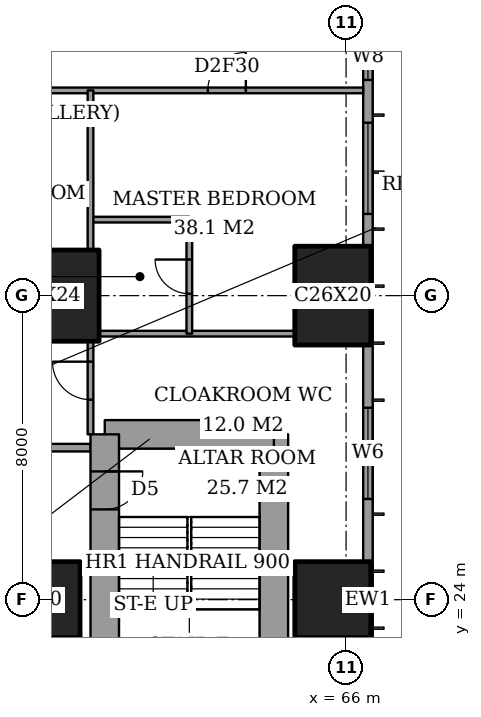
"""IFC4 building model, lengths in metres.
Left out: names, types, materials, properties, quantities, classifications, styles, units other than length and angle.
Written with IfcOpenShell. Run it as: python <this file> out.ifc"""

import sys

from ifc_helpers import new_model, si_unit, direction, frame, frame_2d, origin, origin_2d, place, context, subcontext, project, spatial, rectangle, extrude, element, fill, save


model = new_model("IFC4")
c1 = context("Model", 3, precision=1e-05, world=origin(), true_north=direction((0.0, 1.0)))
c2 = subcontext(c1, "Body", "Model", "MODEL_VIEW")
j1 = project(units=[si_unit("LENGTHUNIT", "METRE"), si_unit("PLANEANGLEUNIT", "RADIAN")], contexts=[c1])
p1 = place(None, origin())
s1 = spatial("IfcSite", under=j1, at=p1, CompositionType="ELEMENT")
p2 = place(p1, origin())
s2 = spatial("IfcBuilding", under=s1, at=p2, CompositionType="ELEMENT")
p3 = place(p2, frame((0.0, 0.0, 33.2)))
s3 = spatial("IfcBuildingStorey", under=s2, at=p3, CompositionType="ELEMENT", Elevation=33.2)
p4 = place(p3, frame((58.0, 24.0, 0.0), z_axis=(0.0, 0.0, 1.0), x_axis=(1.0, 0.0, 0.0)))
e1 = element("IfcColumn", 1, at=p4, inside=s3, PredefinedType="COLUMN", context=c2, shape_type="SweptSolid", body=[
    extrude(rectangle(XDim=2.0, YDim=2.0, at=origin_2d()), origin(), (0.0, 0.0, 1.0), 3.6),
])
p5 = place(p3, frame((58.0, 32.0, 0.0), z_axis=(0.0, 0.0, 1.0), x_axis=(1.0, 0.0, 0.0)))
e2 = element("IfcColumn", 2, at=p5, inside=s3, PredefinedType="COLUMN", context=c2, shape_type="SweptSolid", body=[
    extrude(rectangle(XDim=3.0, YDim=2.4, at=origin_2d()), origin(), (0.0, 0.0, 1.0), 3.6),
])
p6 = place(p3, frame((65.65, 24.0, 0.0), z_axis=(0.0, 0.0, 1.0), x_axis=(1.0, 0.0, 0.0)))
e3 = element("IfcColumn", 3, at=p6, inside=s3, PredefinedType="COLUMN", context=c2, shape_type="SweptSolid", body=[
    extrude(rectangle(XDim=2.0, YDim=2.0, at=origin_2d()), origin(), (0.0, 0.0, 1.0), 3.6),
])
p7 = place(p3, frame((65.65, 32.0, 0.0), z_axis=(0.0, 0.0, 1.0), x_axis=(0.0, 1.0, 0.0)))
e4 = element("IfcColumn", 4, at=p7, inside=s3, PredefinedType="COLUMN", context=c2, shape_type="SweptSolid", body=[
    extrude(rectangle(XDim=2.6, YDim=2.0, at=origin_2d()), origin(), (0.0, 0.0, 1.0), 3.6),
])
p8 = place(p3, frame((64.1, 19.65, 0.0), z_axis=(0.0, 0.0, 1.0), x_axis=(0.0, 1.0, 0.0)))
e5 = element("IfcWall", 5, at=p8, inside=s3, PredefinedType="SHEAR", context=c2, shape_type="SweptSolid", body=[
    extrude(rectangle(XDim=8.7, YDim=0.75, at=frame_2d((4.35, 0.0))), origin(), (0.0, 0.0, 1.0), 3.6),
])
p9 = place(p3, frame((64.1, 28.35, 0.0), z_axis=(0.0, 0.0, 1.0), x_axis=(-1.0, 0.0, 0.0)))
e6 = element("IfcWall", 6, at=p9, inside=s3, PredefinedType="SHEAR", context=c2, shape_type="SweptSolid", body=[
    extrude(rectangle(XDim=4.45, YDim=0.75, at=frame_2d((2.225, 0.0))), origin(), (0.0, 0.0, 1.0), 3.6),
])
p10 = place(p3, frame((59.65, 28.35, 0.0), z_axis=(0.0, 0.0, 1.0), x_axis=(0.0, -1.0, 0.0)))
e7 = element("IfcWall", 7, at=p10, inside=s3, PredefinedType="SHEAR", context=c2, shape_type="SweptSolid", body=[
    extrude(rectangle(XDim=8.7, YDim=0.75, at=frame_2d((4.35, 0.0))), origin(), (0.0, 0.0, 1.0), 3.6),
])
p11 = place(p10, frame((0.975, 0.0, 0.0)))
e8 = element("IfcOpeningElement", 8, at=p11, cuts=e7, PredefinedType="OPENING", context=c2, shape_type="SweptSolid", body=[
    extrude(rectangle(XDim=1.0, YDim=2.1, at=frame_2d((0.5, 1.05))), frame((0.0, 0.385, 0.0), z_axis=(0.0, -1.0, 0.0), x_axis=(1.0, 0.0, 0.0)), (0.0, 0.0, 1.0), 0.77),
])
p12 = place(p3, frame((66.575, 3.175, 0.0), z_axis=(0.0, 0.0, 1.0), x_axis=(0.0, 1.0, 0.0)))
e9 = element("IfcWall", 9, at=p12, inside=s3, PredefinedType="SOLIDWALL", context=c2, shape_type="SweptSolid", body=[
    extrude(rectangle(XDim=41.65, YDim=0.25, at=frame_2d((20.825, 0.0))), origin(), (0.0, 0.0, 1.0), 3.6),
])
p13 = place(p12, frame((0.775, 0.0, 0.6)))
e10 = element("IfcOpeningElement", 10, at=p13, cuts=e9, PredefinedType="OPENING", context=c2, shape_type="SweptSolid", body=[
    extrude(rectangle(XDim=2.4, YDim=2.0, at=frame_2d((1.2, 1.0))), frame((0.0, 0.135, 0.0), z_axis=(0.0, -1.0, 0.0), x_axis=(1.0, 0.0, 0.0)), (0.0, 0.0, 1.0), 0.27),
])
p14 = place(p12, frame((6.1, 0.0, 0.6)))
e11 = element("IfcOpeningElement", 11, at=p14, cuts=e9, PredefinedType="OPENING", context=c2, shape_type="SweptSolid", body=[
    extrude(rectangle(XDim=1.2, YDim=2.0, at=frame_2d((0.6, 1.0))), frame((0.0, 0.135, 0.0), z_axis=(0.0, -1.0, 0.0), x_axis=(1.0, 0.0, 0.0)), (0.0, 0.0, 1.0), 0.27),
])
p15 = place(p12, frame((8.275, 0.0, 0.6)))
e12 = element("IfcOpeningElement", 12, at=p15, cuts=e9, PredefinedType="OPENING", context=c2, shape_type="SweptSolid", body=[
    extrude(rectangle(XDim=2.4, YDim=2.0, at=frame_2d((1.2, 1.0))), frame((0.0, 0.135, 0.0), z_axis=(0.0, -1.0, 0.0), x_axis=(1.0, 0.0, 0.0)), (0.0, 0.0, 1.0), 0.27),
])
p16 = place(p12, frame((15.775, 0.0, 0.6)))
e13 = element("IfcOpeningElement", 13, at=p16, cuts=e9, PredefinedType="OPENING", context=c2, shape_type="SweptSolid", body=[
    extrude(rectangle(XDim=2.4, YDim=2.0, at=frame_2d((1.2, 1.0))), frame((0.0, 0.135, 0.0), z_axis=(0.0, -1.0, 0.0), x_axis=(1.0, 0.0, 0.0)), (0.0, 0.0, 1.0), 0.27),
])
p17 = place(p12, frame((23.475, 0.0, 0.6)))
e14 = element("IfcOpeningElement", 14, at=p17, cuts=e9, PredefinedType="OPENING", context=c2, shape_type="SweptSolid", body=[
    extrude(rectangle(XDim=2.4, YDim=2.0, at=frame_2d((1.2, 1.0))), frame((0.0, 0.135, 0.0), z_axis=(0.0, -1.0, 0.0), x_axis=(1.0, 0.0, 0.0)), (0.0, 0.0, 1.0), 0.27),
])
p18 = place(p12, frame((30.975, 0.0, 0.6)))
e15 = element("IfcOpeningElement", 15, at=p18, cuts=e9, PredefinedType="OPENING", context=c2, shape_type="SweptSolid", body=[
    extrude(rectangle(XDim=2.4, YDim=2.0, at=frame_2d((1.2, 1.0))), frame((0.0, 0.135, 0.0), z_axis=(0.0, -1.0, 0.0), x_axis=(1.0, 0.0, 0.0)), (0.0, 0.0, 1.0), 0.27),
])
p19 = place(p12, frame((34.5, 0.0, 0.6)))
e16 = element("IfcOpeningElement", 16, at=p19, cuts=e9, PredefinedType="OPENING", context=c2, shape_type="SweptSolid", body=[
    extrude(rectangle(XDim=1.2, YDim=2.0, at=frame_2d((0.6, 1.0))), frame((0.0, 0.135, 0.0), z_axis=(0.0, -1.0, 0.0), x_axis=(1.0, 0.0, 0.0)), (0.0, 0.0, 1.0), 0.27),
])
p20 = place(p12, frame((38.475, 0.0, 0.6)))
e17 = element("IfcOpeningElement", 17, at=p20, cuts=e9, PredefinedType="OPENING", context=c2, shape_type="SweptSolid", body=[
    extrude(rectangle(XDim=2.4, YDim=2.0, at=frame_2d((1.2, 1.0))), frame((0.0, 0.135, 0.0), z_axis=(0.0, -1.0, 0.0), x_axis=(1.0, 0.0, 0.0)), (0.0, 0.0, 1.0), 0.27),
])
p21 = place(p3, frame((42.0, 28.0, 0.0), z_axis=(0.0, 0.0, 1.0), x_axis=(1.0, 0.0, 0.0)))
e18 = element("IfcWall", 18, at=p21, inside=s3, PredefinedType="PARTITIONING", context=c2, shape_type="SweptSolid", body=[
    extrude(rectangle(XDim=17.275, YDim=0.2, at=frame_2d((8.637, 0.0))), origin(), (0.0, 0.0, 1.0), 3.35),
])
p22 = place(p21, frame((8.9, 0.0, 0.0)))
e19 = element("IfcOpeningElement", 19, at=p22, cuts=e18, PredefinedType="OPENING", context=c2, shape_type="SweptSolid", body=[
    extrude(rectangle(XDim=1.2, YDim=2.4, at=frame_2d((0.6, 1.2))), frame((0.0, 0.11, 0.0), z_axis=(0.0, -1.0, 0.0), x_axis=(1.0, 0.0, 0.0)), (0.0, 0.0, 1.0), 0.22),
])
p23 = place(p3, frame((59.5, 31.0, 0.0), z_axis=(0.0, 0.0, 1.0), x_axis=(1.0, 0.0, 0.0)))
e20 = element("IfcWall", 20, at=p23, inside=s3, PredefinedType="PARTITIONING", context=c2, shape_type="SweptSolid", body=[
    extrude(rectangle(XDim=5.15, YDim=0.15, at=frame_2d((2.575, 0.0))), origin(), (0.0, 0.0, 1.0), 3.35),
])
p24 = place(p3, frame((59.275, 34.0, 0.0), z_axis=(0.0, 0.0, 1.0), x_axis=(1.0, 0.0, 0.0)))
e21 = element("IfcWall", 21, at=p24, inside=s3, PredefinedType="PARTITIONING", context=c2, shape_type="SweptSolid", body=[
    extrude(rectangle(XDim=2.6, YDim=0.15, at=frame_2d((1.3, 0.0))), origin(), (0.0, 0.0, 1.0), 3.35),
])
p25 = place(p3, frame((41.439, 37.4, 0.0), z_axis=(0.0, 0.0, 1.0), x_axis=(1.0, 0.0, 0.0)))
e22 = element("IfcWall", 22, at=p25, inside=s3, PredefinedType="PARTITIONING", context=c2, shape_type="SweptSolid", body=[
    extrude(rectangle(XDim=25.011, YDim=0.15, at=frame_2d((12.505, 0.0))), origin(), (0.0, 0.0, 1.0), 3.35),
])
p26 = place(p25, frame((11.961, 0.0, 0.0)))
e23 = element("IfcOpeningElement", 23, at=p26, cuts=e22, PredefinedType="OPENING", context=c2, shape_type="SweptSolid", body=[
    extrude(rectangle(XDim=1.0, YDim=2.1, at=frame_2d((0.5, 1.05))), frame((0.0, 0.085, 0.0), z_axis=(0.0, -1.0, 0.0), x_axis=(1.0, 0.0, 0.0)), (0.0, 0.0, 1.0), 0.17),
])
p27 = place(p25, frame((20.924, 0.0, 0.0)))
e24 = element("IfcOpeningElement", 24, at=p27, cuts=e22, PredefinedType="OPENING", context=c2, shape_type="SweptSolid", body=[
    extrude(rectangle(XDim=1.0, YDim=2.1, at=frame_2d((0.5, 1.05))), frame((0.0, 0.085, 0.0), z_axis=(0.0, -1.0, 0.0), x_axis=(1.0, 0.0, 0.0)), (0.0, 0.0, 1.0), 0.17),
])
p28 = place(p25, frame((15.249, 0.0, 0.0)))
e25 = element("IfcOpeningElement", 25, at=p28, cuts=e22, PredefinedType="OPENING", context=c2, shape_type="SweptSolid", body=[
    extrude(rectangle(XDim=0.9, YDim=2.1, at=frame_2d((0.45, 1.05))), frame((0.0, 0.085, 0.0), z_axis=(0.0, -1.0, 0.0), x_axis=(1.0, 0.0, 0.0)), (0.0, 0.0, 1.0), 0.17),
])
p29 = place(p25, frame((9.561, 0.0, 0.0)))
e26 = element("IfcOpeningElement", 26, at=p29, cuts=e22, PredefinedType="OPENING", context=c2, shape_type="SweptSolid", body=[
    extrude(rectangle(XDim=1.0, YDim=2.1, at=frame_2d((0.5, 1.05))), frame((0.0, 0.085, 0.0), z_axis=(0.0, -1.0, 0.0), x_axis=(1.0, 0.0, 0.0)), (0.0, 0.0, 1.0), 0.17),
])
p30 = place(p25, frame((7.161, 0.0, 0.0)))
e27 = element("IfcOpeningElement", 27, at=p30, cuts=e22, PredefinedType="OPENING", context=c2, shape_type="SweptSolid", body=[
    extrude(rectangle(XDim=1.0, YDim=2.1, at=frame_2d((0.5, 1.05))), frame((0.0, 0.085, 0.0), z_axis=(0.0, -1.0, 0.0), x_axis=(1.0, 0.0, 0.0)), (0.0, 0.0, 1.0), 0.17),
])
p31 = place(p25, frame((2.836, 0.0, 0.0)))
e28 = element("IfcOpeningElement", 28, at=p31, cuts=e22, PredefinedType="OPENING", context=c2, shape_type="SweptSolid", body=[
    extrude(rectangle(XDim=1.0, YDim=2.1, at=frame_2d((0.5, 1.05))), frame((0.0, 0.085, 0.0), z_axis=(0.0, -1.0, 0.0), x_axis=(1.0, 0.0, 0.0)), (0.0, 0.0, 1.0), 0.17),
])
p32 = place(p3, frame((59.275, 28.35, 0.0), z_axis=(0.0, 0.0, 1.0), x_axis=(0.0, 1.0, 0.0)))
e29 = element("IfcWall", 29, at=p32, inside=s3, PredefinedType="PARTITIONING", context=c2, shape_type="SweptSolid", body=[
    extrude(rectangle(XDim=2.45, YDim=0.15, at=frame_2d((1.225, 0.0))), origin(), (0.0, 0.0, 1.0), 3.35),
])
p33 = place(p32, frame((0.913, 0.0, 0.0)))
e30 = element("IfcOpeningElement", 30, at=p33, cuts=e29, PredefinedType="OPENING", context=c2, shape_type="SweptSolid", body=[
    extrude(rectangle(XDim=1.0, YDim=2.1, at=frame_2d((0.5, 1.05))), frame((0.0, 0.085, 0.0), z_axis=(0.0, -1.0, 0.0), x_axis=(1.0, 0.0, 0.0)), (0.0, 0.0, 1.0), 0.17),
])
p34 = place(p3, frame((59.275, 33.2, 0.0), z_axis=(0.0, 0.0, 1.0), x_axis=(0.0, 1.0, 0.0)))
e31 = element("IfcWall", 31, at=p34, inside=s3, PredefinedType="PARTITIONING", context=c2, shape_type="SweptSolid", body=[
    extrude(rectangle(XDim=4.2, YDim=0.15, at=frame_2d((2.1, 0.0))), origin(), (0.0, 0.0, 1.0), 3.35),
])
p35 = place(p3, frame((61.875, 31.0, 0.0), z_axis=(0.0, 0.0, 1.0), x_axis=(0.0, 1.0, 0.0)))
e32 = element("IfcWall", 32, at=p35, inside=s3, PredefinedType="PARTITIONING", context=c2, shape_type="SweptSolid", body=[
    extrude(rectangle(XDim=3.0, YDim=0.15, at=frame_2d((1.5, 0.0))), origin(), (0.0, 0.0, 1.0), 3.35),
])
p36 = place(p35, frame((1.05, 0.0, 0.0)))
e33 = element("IfcOpeningElement", 33, at=p36, cuts=e32, PredefinedType="OPENING", context=c2, shape_type="SweptSolid", body=[
    extrude(rectangle(XDim=0.9, YDim=2.1, at=frame_2d((0.45, 1.05))), frame((0.0, 0.085, 0.0), z_axis=(0.0, -1.0, 0.0), x_axis=(1.0, 0.0, 0.0)), (0.0, 0.0, 1.0), 0.17),
])
p37 = place(p17, origin())
e34 = element("IfcWindow", 34, at=p37, inside=s3, PartitioningType="SINGLE_PANEL", PredefinedType="WINDOW", context=c2, shape_type="SweptSolid", body=[
    extrude(rectangle(XDim=2.4, YDim=2.0, at=frame_2d((1.2, 1.0))), frame((0.0, 0.03, 0.0), z_axis=(0.0, -1.0, 0.0), x_axis=(1.0, 0.0, 0.0)), (0.0, 0.0, 1.0), 0.06),
])
fill(e14, e34)
p38 = place(p18, origin())
e35 = element("IfcWindow", 35, at=p38, inside=s3, PartitioningType="SINGLE_PANEL", PredefinedType="WINDOW", context=c2, shape_type="SweptSolid", body=[
    extrude(rectangle(XDim=2.4, YDim=2.0, at=frame_2d((1.2, 1.0))), frame((0.0, 0.03, 0.0), z_axis=(0.0, -1.0, 0.0), x_axis=(1.0, 0.0, 0.0)), (0.0, 0.0, 1.0), 0.06),
])
fill(e15, e35)
p39 = place(p19, origin())
e36 = element("IfcWindow", 36, at=p39, inside=s3, PartitioningType="SINGLE_PANEL", PredefinedType="WINDOW", context=c2, shape_type="SweptSolid", body=[
    extrude(rectangle(XDim=1.2, YDim=2.0, at=frame_2d((0.6, 1.0))), frame((0.0, 0.03, 0.0), z_axis=(0.0, -1.0, 0.0), x_axis=(1.0, 0.0, 0.0)), (0.0, 0.0, 1.0), 0.06),
])
fill(e16, e36)
p40 = place(p36, origin())
e37 = element("IfcDoor", 37, at=p40, inside=s3, OperationType="SINGLE_SWING_LEFT", PredefinedType="DOOR", context=c2, shape_type="SweptSolid", body=[
    extrude(rectangle(XDim=0.9, YDim=2.1, at=frame_2d((0.45, 1.05))), frame((0.0, 0.025, 0.0), z_axis=(0.0, -1.0, 0.0), x_axis=(1.0, 0.0, 0.0)), (0.0, 0.0, 1.0), 0.05),
])
fill(e33, e37)
p41 = place(p27, origin())
e38 = element("IfcDoor", 38, at=p41, inside=s3, OperationType="SINGLE_SWING_LEFT", PredefinedType="DOOR", context=c2, shape_type="SweptSolid", body=[
    extrude(rectangle(XDim=1.0, YDim=2.1, at=frame_2d((0.5, 1.05))), frame((0.0, 0.025, 0.0), z_axis=(0.0, -1.0, 0.0), x_axis=(1.0, 0.0, 0.0)), (0.0, 0.0, 1.0), 0.05),
])
fill(e24, e38)
p42 = place(p33, origin())
e39 = element("IfcDoor", 39, at=p42, inside=s3, OperationType="SINGLE_SWING_LEFT", PredefinedType="DOOR", context=c2, shape_type="SweptSolid", body=[
    extrude(rectangle(XDim=1.0, YDim=2.1, at=frame_2d((0.5, 1.05))), frame((0.0, 0.025, 0.0), z_axis=(0.0, -1.0, 0.0), x_axis=(1.0, 0.0, 0.0)), (0.0, 0.0, 1.0), 0.05),
])
fill(e30, e39)
p43 = place(p11, origin())
e40 = element("IfcDoor", 40, at=p43, inside=s3, OperationType="SINGLE_SWING_RIGHT", PredefinedType="DOOR", context=c2, shape_type="SweptSolid", body=[
    extrude(rectangle(XDim=1.0, YDim=2.1, at=frame_2d((0.5, 1.05))), frame((0.0, 0.025, 0.0), z_axis=(0.0, -1.0, 0.0), x_axis=(1.0, 0.0, 0.0)), (0.0, 0.0, 1.0), 0.05),
])
fill(e8, e40)
save(model, sys.argv[1])
